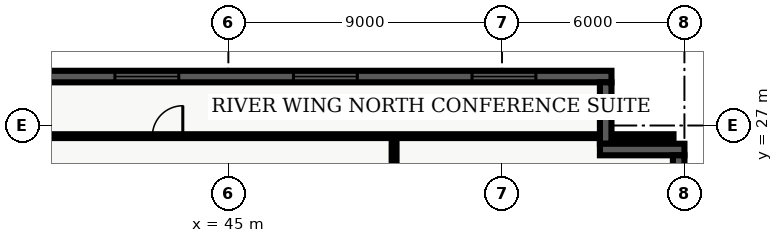
"""IFC4 building model, lengths in metres.
Left out: names, types, materials, properties, quantities, classifications, styles, units other than length and angle.
Written with IfcOpenShell. Run it as: python <this file> out.ifc"""

import sys

from ifc_helpers import new_model, entity, si_unit, converted_unit, direction, frame, origin_with_axes, origin_2d_with_axis, place, context, subcontext, project, spatial, polyline, rectangle, outline, extrude, element, fill, save


model = new_model("IFC4")
c1 = context("Model", 3, precision=1e-05, world=origin_with_axes(), true_north=direction((0.0, 1.0)))
c2 = subcontext(c1, "Body", "Model", "MODEL_VIEW")
j1 = project(units=[si_unit("LENGTHUNIT", "METRE"), converted_unit("PLANEANGLEUNIT", "DEGREE", entity("IfcPlaneAngleMeasure", 0.017), si_unit("PLANEANGLEUNIT", "RADIAN"), dimensions=[0, 0, 0, 0, 0, 0, 0])], contexts=[c1])
p1 = place(None, origin_with_axes())
s1 = spatial("IfcSite", under=j1, at=p1, CompositionType="ELEMENT")
p2 = place(p1, origin_with_axes())
s2 = spatial("IfcBuilding", under=s1, at=p2, CompositionType="ELEMENT")
p3 = place(p2, frame((0.0, 0.0, 120.3), z_axis=(0.0, 0.0, 1.0), x_axis=(1.0, 0.0, 0.0)))
s3 = spatial("IfcBuildingStorey", under=s2, at=p3, CompositionType="ELEMENT", Elevation=120.3)
p4 = place(p3, frame((50.45, 7.85, 0.0), z_axis=(0.0, 0.0, 1.0), x_axis=(0.0, 1.0, 0.0)))
e1 = element("IfcWall", 1, at=p4, inside=s3, PredefinedType="PARTITIONING", context=c2, shape_type="SweptSolid", body=[
    extrude(outline(polyline([(0.0, -0.08), (18.8, -0.08), (18.8, 0.08), (0.0, 0.08), (0.0, -0.08)])), origin_with_axes(), (0.0, 0.0, 1.0), 2.64),
])
p5 = place(p4, frame((5.836, 0.0, 0.0), z_axis=(0.0, 0.0, 1.0), x_axis=(1.0, 0.0, 0.0)))
e2 = element("IfcOpeningElement", 2, at=p5, cuts=e1, PredefinedType="OPENING", context=c2, shape_type="SweptSolid", body=[
    extrude(rectangle(XDim=1.0, YDim=0.18, at=origin_2d_with_axis()), origin_with_axes(), (0.0, 0.0, 1.0), 2.15),
])
p6 = place(p4, frame((11.622, 0.0, 0.0), z_axis=(0.0, 0.0, 1.0), x_axis=(1.0, 0.0, 0.0)))
e3 = element("IfcOpeningElement", 3, at=p6, cuts=e1, PredefinedType="OPENING", context=c2, shape_type="SweptSolid", body=[
    extrude(rectangle(XDim=1.0, YDim=0.18, at=origin_2d_with_axis()), origin_with_axes(), (0.0, 0.0, 1.0), 2.15),
])
p7 = place(p4, frame((14.125, 0.0, 0.0), z_axis=(0.0, 0.0, 1.0), x_axis=(1.0, 0.0, 0.0)))
e4 = element("IfcOpeningElement", 4, at=p7, cuts=e1, PredefinedType="OPENING", context=c2, shape_type="SweptSolid", body=[
    extrude(rectangle(XDim=1.0, YDim=0.18, at=origin_2d_with_axis()), origin_with_axes(), (0.0, 0.0, 1.0), 2.15),
])
p8 = place(p3, frame((38.76, 26.65, 0.0), z_axis=(0.0, 0.0, 1.0), x_axis=(1.0, 0.0, 0.0)))
e5 = element("IfcWall", 5, at=p8, inside=s3, PredefinedType="PARTITIONING", context=c2, shape_type="SweptSolid", body=[
    extrude(outline(polyline([(0.0, -0.062), (20.88, -0.062), (20.88, 0.062), (0.0, 0.062), (0.0, -0.062)])), origin_with_axes(), (0.0, 0.0, 1.0), 2.64),
])
p9 = place(p8, frame((4.24, 0.0, 0.0), z_axis=(0.0, 0.0, 1.0), x_axis=(1.0, 0.0, 0.0)))
e6 = element("IfcOpeningElement", 6, at=p9, cuts=e5, PredefinedType="OPENING", context=c2, shape_type="SweptSolid", body=[
    extrude(rectangle(XDim=1.0, YDim=0.145, at=origin_2d_with_axis()), origin_with_axes(), (0.0, 0.0, 1.0), 2.15),
])
p10 = place(p3, frame((38.78, 28.61, 0.0), z_axis=(0.0, 0.0, 1.0), x_axis=(1.0, 0.0, 0.0)))
e7 = element("IfcWall", 7, at=p10, inside=s3, PredefinedType="SOLIDWALL", context=c2, shape_type="SweptSolid", body=[
    extrude(outline(polyline([(0.0, -0.19), (18.82, -0.19), (18.82, 0.19), (0.0, 0.19), (0.0, -0.19)])), origin_with_axes(), (0.0, 0.0, 1.0), 3.6),
])
p11 = place(p10, frame((3.537, 0.0, 0.45), z_axis=(0.0, 0.0, 1.0), x_axis=(1.0, 0.0, 0.0)))
e8 = element("IfcOpeningElement", 8, at=p11, cuts=e7, PredefinedType="OPENING", context=c2, shape_type="SweptSolid", body=[
    extrude(rectangle(XDim=2.1, YDim=0.4, at=origin_2d_with_axis()), origin_with_axes(), (0.0, 0.0, 1.0), 2.2),
])
p12 = place(p10, frame((9.41, 0.0, 0.45), z_axis=(0.0, 0.0, 1.0), x_axis=(1.0, 0.0, 0.0)))
e9 = element("IfcOpeningElement", 9, at=p12, cuts=e7, PredefinedType="OPENING", context=c2, shape_type="SweptSolid", body=[
    extrude(rectangle(XDim=2.1, YDim=0.4, at=origin_2d_with_axis()), origin_with_axes(), (0.0, 0.0, 1.0), 2.2),
])
p13 = place(p10, frame((15.283, 0.0, 0.45), z_axis=(0.0, 0.0, 1.0), x_axis=(1.0, 0.0, 0.0)))
e10 = element("IfcOpeningElement", 10, at=p13, cuts=e7, PredefinedType="OPENING", context=c2, shape_type="SweptSolid", body=[
    extrude(rectangle(XDim=2.1, YDim=0.4, at=origin_2d_with_axis()), origin_with_axes(), (0.0, 0.0, 1.0), 2.2),
])
p14 = place(p3, frame((57.41, 28.42, 0.0), z_axis=(0.0, 0.0, 1.0), x_axis=(0.0, -1.0, 0.0)))
e11 = element("IfcWall", 11, at=p14, inside=s3, PredefinedType="SOLIDWALL", context=c2, shape_type="SweptSolid", body=[
    extrude(outline(polyline([(0.0, -0.19), (2.02, -0.19), (2.02, 0.19), (0.0, 0.19), (0.0, -0.19)])), origin_with_axes(), (0.0, 0.0, 1.0), 3.6),
])
p15 = place(p3, frame((57.22, 26.21, 0.0), z_axis=(0.0, 0.0, 1.0), x_axis=(1.0, 0.0, 0.0)))
e12 = element("IfcWall", 12, at=p15, inside=s3, PredefinedType="SOLIDWALL", context=c2, shape_type="SweptSolid", body=[
    extrude(outline(polyline([(0.0, -0.19), (2.78, -0.19), (2.78, 0.19), (0.0, 0.19), (0.0, -0.19)])), origin_with_axes(), (0.0, 0.0, 1.0), 3.6),
])
p16 = place(p3, frame((59.81, 26.02, 0.0), z_axis=(0.0, 0.0, 1.0), x_axis=(0.0, -1.0, 0.0)))
e13 = element("IfcWall", 13, at=p16, inside=s3, PredefinedType="SOLIDWALL", context=c2, shape_type="SweptSolid", body=[
    extrude(outline(polyline([(0.0, -0.19), (23.62, -0.19), (23.62, 0.19), (0.0, 0.19), (0.0, -0.19)])), origin_with_axes(), (0.0, 0.0, 1.0), 3.6),
])
p17 = place(p16, frame((20.218, 0.0, 0.45), z_axis=(0.0, 0.0, 1.0), x_axis=(1.0, 0.0, 0.0)))
e14 = element("IfcOpeningElement", 14, at=p17, cuts=e13, PredefinedType="OPENING", context=c2, shape_type="SweptSolid", body=[
    extrude(rectangle(XDim=2.1, YDim=0.4, at=origin_2d_with_axis()), origin_with_axes(), (0.0, 0.0, 1.0), 2.2),
])
p18 = place(p8, frame((4.24, 0.0, 0.0), z_axis=(0.0, 0.0, 1.0), x_axis=(1.0, 0.0, 0.0)))
e15 = element("IfcDoor", 15, at=p18, inside=s3, OperationType="SINGLE_SWING_RIGHT", PredefinedType="DOOR", context=c2, shape_type="SweptSolid", body=[
    extrude(rectangle(XDim=1.0, YDim=0.075, at=origin_2d_with_axis()), origin_with_axes(), (0.0, 0.0, 1.0), 2.15),
])
fill(e6, e15)
p19 = place(p10, frame((3.537, 0.0, 0.45), z_axis=(0.0, 0.0, 1.0), x_axis=(1.0, 0.0, 0.0)))
e16 = element("IfcWindow", 16, at=p19, inside=s3, PredefinedType="WINDOW", context=c2, shape_type="SweptSolid", body=[
    extrude(rectangle(XDim=2.1, YDim=0.09, at=origin_2d_with_axis()), origin_with_axes(), (0.0, 0.0, 1.0), 2.2),
])
fill(e8, e16)
p20 = place(p10, frame((9.41, 0.0, 0.45), z_axis=(0.0, 0.0, 1.0), x_axis=(1.0, 0.0, 0.0)))
e17 = element("IfcWindow", 17, at=p20, inside=s3, PredefinedType="WINDOW", context=c2, shape_type="SweptSolid", body=[
    extrude(rectangle(XDim=2.1, YDim=0.09, at=origin_2d_with_axis()), origin_with_axes(), (0.0, 0.0, 1.0), 2.2),
])
fill(e9, e17)
p21 = place(p10, frame((15.283, 0.0, 0.45), z_axis=(0.0, 0.0, 1.0), x_axis=(1.0, 0.0, 0.0)))
e18 = element("IfcWindow", 18, at=p21, inside=s3, PredefinedType="WINDOW", context=c2, shape_type="SweptSolid", body=[
    extrude(rectangle(XDim=2.1, YDim=0.09, at=origin_2d_with_axis()), origin_with_axes(), (0.0, 0.0, 1.0), 2.2),
])
fill(e10, e18)
save(model, sys.argv[1])
